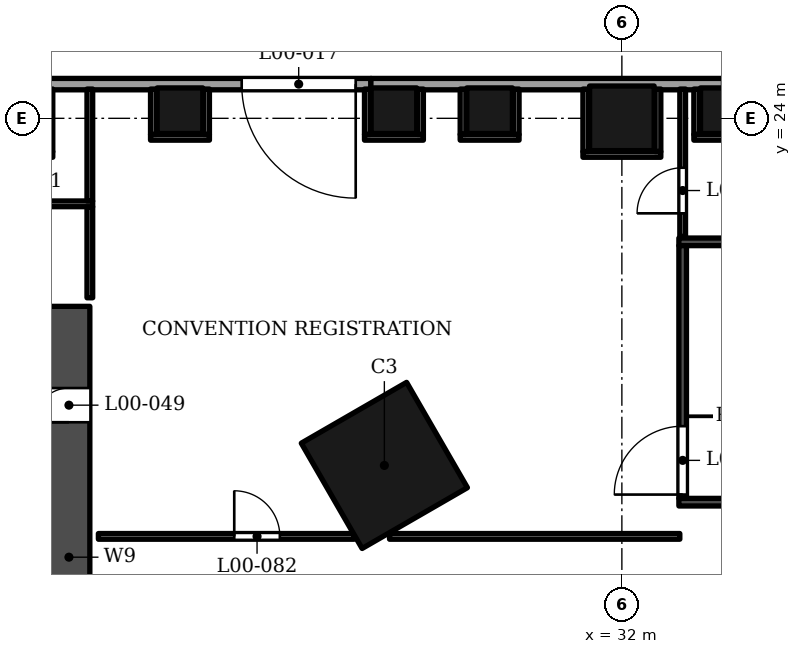
"""IFC4 building model, lengths in metres.
Left out: names, types, materials, properties, quantities, classifications, styles, units other than length and angle.
Written with IfcOpenShell. Run it as: python <this file> out.ifc"""

import sys

from ifc_helpers import new_model, si_unit, direction, frame, frame_2d, origin, origin_2d, place, context, subcontext, project, spatial, rectangle, extrude, element, fill, save


model = new_model("IFC4")
c1 = context("Model", 3, precision=1e-05, world=origin(), true_north=direction((0.0, 1.0)))
c2 = subcontext(c1, "Body", "Model", "MODEL_VIEW")
j1 = project(units=[si_unit("LENGTHUNIT", "METRE"), si_unit("PLANEANGLEUNIT", "RADIAN")], contexts=[c1])
p1 = place(None, origin())
s1 = spatial("IfcSite", under=j1, at=p1, CompositionType="ELEMENT")
p2 = place(p1, origin())
s2 = spatial("IfcBuilding", under=s1, at=p2, CompositionType="ELEMENT")
p3 = place(p2, origin())
s3 = spatial("IfcBuildingStorey", under=s2, at=p3, CompositionType="ELEMENT", Elevation=0.0)
p4 = place(p3, frame((32.0, 24.0, 0.0), z_axis=(0.0, 0.0, 1.0), x_axis=(1.0, 0.0, 0.0)))
e1 = element("IfcColumn", 1, at=p4, inside=s3, PredefinedType="COLUMN", context=c2, shape_type="SweptSolid", body=[
    extrude(rectangle(XDim=1.7, YDim=1.7, at=origin_2d()), origin(), (0.0, 0.0, 1.0), 9.0),
])
for number, where, z_axis, x_axis in (
    (2, (34.669, 24.2, 0.0), (0.0, 0.0, 1.0), (1.0, 0.0, 0.0)),
    (3, (26.002, 24.2, 0.0), (0.0, 0.0, 1.0), (1.0, 0.0, 0.0)),
    (4, (20.372, 24.2, 0.0), (0.0, 0.0, 1.0), (1.0, 0.0, 0.0)),
    (5, (28.52, 24.2, 0.0), (0.0, 0.0, 1.0), (1.0, 0.0, 0.0)),
):
    element("IfcColumn", number, at=place(p3, frame(where, z_axis=z_axis, x_axis=x_axis)), inside=s3, PredefinedType="COLUMN", context=c2, shape_type="SweptSolid", body=[
        extrude(rectangle(XDim=1.2, YDim=1.2, at=origin_2d()), origin(), (0.0, 0.0, 1.0), 9.0),
    ])
p5 = place(p3, frame((25.75, 14.867, 0.0), z_axis=(0.0, 0.0, 1.0), x_axis=(-0.866025386331, -0.50000003023, 0.0)))
e6 = element("IfcColumn", 6, at=p5, inside=s3, PredefinedType="COLUMN", context=c2, shape_type="SweptSolid", body=[
    extrude(rectangle(XDim=3.2, YDim=3.2, at=origin_2d()), origin(), (0.0, 0.0, 1.0), 9.0),
])
p6 = place(p3, frame((17.45, 5.853, 0.0), z_axis=(0.0, 0.0, 1.0), x_axis=(0.0, 1.0, 0.0)))
e7 = element("IfcWall", 7, at=p6, inside=s3, PredefinedType="SHEAR", context=c2, shape_type="SweptSolid", body=[
    extrude(rectangle(XDim=13.2, YDim=1.1, at=frame_2d((6.6, 0.0))), origin(), (0.0, 0.0, 1.0), 9.0),
])
p7 = place(p6, frame((4.1, 0.0, 0.0)))
e8 = element("IfcOpeningElement", 8, at=p7, cuts=e7, PredefinedType="OPENING", context=c2, shape_type="SweptSolid", body=[
    extrude(rectangle(XDim=1.6, YDim=2.1, at=frame_2d((0.8, 1.05))), frame((0.0, 0.56, 0.0), z_axis=(0.0, -1.0, 0.0), x_axis=(1.0, 0.0, 0.0)), (0.0, 0.0, 1.0), 1.12),
])
p8 = place(p6, frame((10.15, 0.0, 0.0)))
e9 = element("IfcOpeningElement", 9, at=p8, cuts=e7, PredefinedType="OPENING", context=c2, shape_type="SweptSolid", body=[
    extrude(rectangle(XDim=0.9, YDim=2.1, at=frame_2d((0.45, 1.05))), frame((0.0, 0.56, 0.0), z_axis=(0.0, -1.0, 0.0), x_axis=(1.0, 0.0, 0.0)), (0.0, 0.0, 1.0), 1.12),
])
p9 = place(p3, frame((25.396, 24.9, 0.0), z_axis=(0.0, 0.0, 1.0), x_axis=(-1.0, 0.0, 0.0)))
e10 = element("IfcWall", 10, at=p9, inside=s3, PredefinedType="ELEMENTEDWALL", context=c2, shape_type="SweptSolid", body=[
    extrude(rectangle(XDim=25.15, YDim=0.3, at=frame_2d((12.575, 0.0))), origin(), (0.0, 0.0, 1.0), 7.6),
])
p10 = place(p9, frame((0.4, 0.0, 0.0)))
e11 = element("IfcOpeningElement", 11, at=p10, cuts=e10, PredefinedType="OPENING", context=c2, shape_type="SweptSolid", body=[
    extrude(rectangle(XDim=3.0, YDim=2.7, at=frame_2d((1.5, 1.35))), frame((0.0, 0.16, 0.0), z_axis=(0.0, -1.0, 0.0), x_axis=(1.0, 0.0, 0.0)), (0.0, 0.0, 1.0), 0.32),
])
p11 = place(p3, frame((34.673, 24.9, 0.0), z_axis=(0.0, 0.0, 1.0), x_axis=(-1.0, 0.0, 0.0)))
e12 = element("IfcWall", 12, at=p11, inside=s3, PredefinedType="SOLIDWALL", context=c2, shape_type="SweptSolid", body=[
    extrude(rectangle(XDim=9.277, YDim=0.3, at=frame_2d((4.639, 0.0))), origin(), (0.0, 0.0, 1.0), 7.6),
])
for number, where, z_axis, x_axis in (
    (13, (33.5, 13.9, 0.0), (0.0, 0.0, 1.0), (1.0, 0.0, 0.0)),
    (14, (33.5, 20.75, 0.0), (0.0, 0.0, 1.0), (1.0, 0.0, 0.0)),
):
    element("IfcWall", number, at=place(p3, frame(where, z_axis=z_axis, x_axis=x_axis)), inside=s3, PredefinedType="SOLIDWALL", context=c2, shape_type="SweptSolid", body=[
        extrude(rectangle(XDim=4.87, YDim=0.2, at=frame_2d((2.435, 0.0))), origin(), (0.0, 0.0, 1.0), 8.5),
    ])
p12 = place(p3, frame((33.6, 14.0, 0.0), z_axis=(0.0, 0.0, 1.0), x_axis=(0.0, 1.0, 0.0)))
e15 = element("IfcWall", 15, at=p12, inside=s3, PredefinedType="SOLIDWALL", context=c2, shape_type="SweptSolid", body=[
    extrude(rectangle(XDim=6.65, YDim=0.2, at=frame_2d((3.325, 0.0))), origin(), (0.0, 0.0, 1.0), 8.5),
])
p13 = place(p12, frame((0.1, 0.0, 0.0)))
e16 = element("IfcOpeningElement", 16, at=p13, cuts=e15, PredefinedType="OPENING", context=c2, shape_type="SweptSolid", body=[
    extrude(rectangle(XDim=1.8, YDim=2.4, at=frame_2d((0.9, 1.2))), frame((0.0, 0.11, 0.0), z_axis=(0.0, -1.0, 0.0), x_axis=(1.0, 0.0, 0.0)), (0.0, 0.0, 1.0), 0.22),
])
p14 = place(p3, frame((18.225, 13.0, 0.0), z_axis=(0.0, 0.0, 1.0), x_axis=(1.0, 0.0, 0.0)))
e17 = element("IfcWall", 17, at=p14, inside=s3, PredefinedType="PARTITIONING", context=c2, shape_type="SweptSolid", body=[
    extrude(rectangle(XDim=6.732, YDim=0.15, at=frame_2d((3.366, 0.0))), origin(), (0.0, 0.0, 1.0), 7.6),
])
p15 = place(p14, frame((3.575, 0.0, 0.0)))
e18 = element("IfcOpeningElement", 18, at=p15, cuts=e17, PredefinedType="OPENING", context=c2, shape_type="SweptSolid", body=[
    extrude(rectangle(XDim=1.2, YDim=2.1, at=frame_2d((0.6, 1.05))), frame((0.0, 0.085, 0.0), z_axis=(0.0, -1.0, 0.0), x_axis=(1.0, 0.0, 0.0)), (0.0, 0.0, 1.0), 0.17),
])
p16 = place(p3, frame((25.886, 13.0, 0.0), z_axis=(0.0, 0.0, 1.0), x_axis=(1.0, 0.0, 0.0)))
e19 = element("IfcWall", 19, at=p16, inside=s3, PredefinedType="PARTITIONING", context=c2, shape_type="SweptSolid", body=[
    extrude(rectangle(XDim=7.639, YDim=0.15, at=frame_2d((3.819, 0.0))), origin(), (0.0, 0.0, 1.0), 7.3),
])
p17 = place(p3, frame((18.0, 19.278, 0.0), z_axis=(0.0, 0.0, 1.0), x_axis=(0.0, 1.0, 0.0)))
e20 = element("IfcWall", 20, at=p17, inside=s3, PredefinedType="PARTITIONING", context=c2, shape_type="SweptSolid", body=[
    extrude(rectangle(XDim=2.397, YDim=0.15, at=frame_2d((1.198, 0.0))), origin(), (0.0, 0.0, 1.0), 8.5),
])
p18 = place(p3, frame((33.6, 20.89, 0.0), z_axis=(0.0, 0.0, 1.0), x_axis=(0.0, 1.0, 0.0)))
e21 = element("IfcWall", 21, at=p18, inside=s3, PredefinedType="PARTITIONING", context=c2, shape_type="SweptSolid", body=[
    extrude(rectangle(XDim=3.88, YDim=0.15, at=frame_2d((1.94, 0.0))), origin(), (0.0, 0.0, 1.0), 7.6),
])
p19 = place(p18, frame((0.61, 0.0, 0.0)))
e22 = element("IfcOpeningElement", 22, at=p19, cuts=e21, PredefinedType="OPENING", context=c2, shape_type="SweptSolid", body=[
    extrude(rectangle(XDim=1.2, YDim=2.1, at=frame_2d((0.6, 1.05))), frame((0.0, 0.085, 0.0), z_axis=(0.0, -1.0, 0.0), x_axis=(1.0, 0.0, 0.0)), (0.0, 0.0, 1.0), 0.17),
])
p20 = place(p3, frame((-18.075, 21.75, 0.0), z_axis=(0.0, 0.0, 1.0), x_axis=(1.0, 0.0, 0.0)))
e23 = element("IfcWall", 23, at=p20, inside=s3, PredefinedType="PARTITIONING", context=c2, shape_type="SweptSolid", body=[
    extrude(rectangle(XDim=36.15, YDim=0.15, at=frame_2d((18.075, 0.0))), origin(), (0.0, 0.0, 1.0), 7.3),
])
p21 = place(p20, frame((2.675, 0.0, 0.0)))
e24 = element("IfcOpeningElement", 24, at=p21, cuts=e23, PredefinedType="OPENING", context=c2, shape_type="SweptSolid", body=[
    extrude(rectangle(XDim=0.9, YDim=2.1, at=frame_2d((0.45, 1.05))), frame((0.0, 0.085, 0.0), z_axis=(0.0, -1.0, 0.0), x_axis=(1.0, 0.0, 0.0)), (0.0, 0.0, 1.0), 0.17),
])
p22 = place(p20, frame((8.675, 0.0, 0.0)))
e25 = element("IfcOpeningElement", 25, at=p22, cuts=e23, PredefinedType="OPENING", context=c2, shape_type="SweptSolid", body=[
    extrude(rectangle(XDim=0.9, YDim=2.1, at=frame_2d((0.45, 1.05))), frame((0.0, 0.085, 0.0), z_axis=(0.0, -1.0, 0.0), x_axis=(1.0, 0.0, 0.0)), (0.0, 0.0, 1.0), 0.17),
])
p23 = place(p20, frame((14.675, 0.0, 0.0)))
e26 = element("IfcOpeningElement", 26, at=p23, cuts=e23, PredefinedType="OPENING", context=c2, shape_type="SweptSolid", body=[
    extrude(rectangle(XDim=0.9, YDim=2.1, at=frame_2d((0.45, 1.05))), frame((0.0, 0.085, 0.0), z_axis=(0.0, -1.0, 0.0), x_axis=(1.0, 0.0, 0.0)), (0.0, 0.0, 1.0), 0.17),
])
p24 = place(p20, frame((20.675, 0.0, 0.0)))
e27 = element("IfcOpeningElement", 27, at=p24, cuts=e23, PredefinedType="OPENING", context=c2, shape_type="SweptSolid", body=[
    extrude(rectangle(XDim=0.9, YDim=2.1, at=frame_2d((0.45, 1.05))), frame((0.0, 0.085, 0.0), z_axis=(0.0, -1.0, 0.0), x_axis=(1.0, 0.0, 0.0)), (0.0, 0.0, 1.0), 0.17),
])
p25 = place(p20, frame((26.675, 0.0, 0.0)))
e28 = element("IfcOpeningElement", 28, at=p25, cuts=e23, PredefinedType="OPENING", context=c2, shape_type="SweptSolid", body=[
    extrude(rectangle(XDim=0.9, YDim=2.1, at=frame_2d((0.45, 1.05))), frame((0.0, 0.085, 0.0), z_axis=(0.0, -1.0, 0.0), x_axis=(1.0, 0.0, 0.0)), (0.0, 0.0, 1.0), 0.17),
])
p26 = place(p20, frame((32.675, 0.0, 0.0)))
e29 = element("IfcOpeningElement", 29, at=p26, cuts=e23, PredefinedType="OPENING", context=c2, shape_type="SweptSolid", body=[
    extrude(rectangle(XDim=0.9, YDim=2.1, at=frame_2d((0.45, 1.05))), frame((0.0, 0.085, 0.0), z_axis=(0.0, -1.0, 0.0), x_axis=(1.0, 0.0, 0.0)), (0.0, 0.0, 1.0), 0.17),
])
p27 = place(p3, frame((18.0, 21.825, 0.0), z_axis=(0.0, 0.0, 1.0), x_axis=(0.0, 1.0, 0.0)))
e30 = element("IfcWall", 30, at=p27, inside=s3, PredefinedType="PARTITIONING", context=c2, shape_type="SweptSolid", body=[
    extrude(rectangle(XDim=2.945, YDim=0.15, at=frame_2d((1.473, 0.0))), origin(), (0.0, 0.0, 1.0), 7.3),
])
for number, where, z_axis, x_axis in (
    (31, (14.975, 23.05, 0.0), (0.0, 0.0, 1.0), (1.0, 0.0, 0.0)),
    (32, (30.975, 23.05, 0.0), (0.0, 0.0, 1.0), (1.0, 0.0, 0.0)),
):
    element("IfcWall", number, at=place(p3, frame(where, z_axis=z_axis, x_axis=x_axis)), inside=s3, PredefinedType="PARTITIONING", context=c2, shape_type="SweptSolid", body=[
        extrude(rectangle(XDim=2.05, YDim=0.15, at=frame_2d((1.025, 0.0))), origin(), (0.0, 0.0, 1.0), 7.3),
    ])
for number, where, z_axis, x_axis in (
    (33, (16.95, 23.125, 0.0), (0.0, 0.0, 1.0), (0.0, 1.0, 0.0)),
    (34, (31.05, 23.125, 0.0), (0.0, 0.0, 1.0), (0.0, 1.0, 0.0)),
):
    element("IfcWall", number, at=place(p3, frame(where, z_axis=z_axis, x_axis=x_axis)), inside=s3, PredefinedType="PARTITIONING", context=c2, shape_type="SweptSolid", body=[
        extrude(rectangle(XDim=1.645, YDim=0.15, at=frame_2d((0.823, 0.0))), origin(), (0.0, 0.0, 1.0), 7.3),
    ])
p28 = place(p3, frame((32.95, 23.125, 0.0), z_axis=(0.0, 0.0, 1.0), x_axis=(0.0, 1.0, 0.0)))
e35 = element("IfcWall", 35, at=p28, inside=s3, PredefinedType="PARTITIONING", context=c2, shape_type="SweptSolid", body=[
    extrude(rectangle(XDim=1.645, YDim=0.15, at=frame_2d((0.823, 0.0))), origin(), (0.0, 0.0, 1.0), 7.6),
])
for number, where, z_axis, x_axis in (
    (36, (19.597, 23.5, 0.0), (0.0, 0.0, 1.0), (1.0, 0.0, 0.0)),
    (37, (25.227, 23.5, 0.0), (0.0, 0.0, 1.0), (1.0, 0.0, 0.0)),
):
    element("IfcWall", number, at=place(p3, frame(where, z_axis=z_axis, x_axis=x_axis)), inside=s3, PredefinedType="PARTITIONING", context=c2, shape_type="SweptSolid", body=[
        extrude(rectangle(XDim=1.55, YDim=0.15, at=frame_2d((0.775, 0.0))), origin(), (0.0, 0.0, 1.0), 8.5),
    ])
p29 = place(p3, frame((27.745, 23.5, 0.0), z_axis=(0.0, 0.0, 1.0), x_axis=(1.0, 0.0, 0.0)))
e38 = element("IfcWall", 38, at=p29, inside=s3, PredefinedType="PARTITIONING", context=c2, shape_type="SweptSolid", body=[
    extrude(rectangle(XDim=1.55, YDim=0.15, at=frame_2d((0.775, 0.0))), origin(), (0.0, 0.0, 1.0), 8.5),
])
p30 = place(p3, frame((33.894, 23.5, 0.0), z_axis=(0.0, 0.0, 1.0), x_axis=(1.0, 0.0, 0.0)))
e39 = element("IfcWall", 39, at=p30, inside=s3, PredefinedType="PARTITIONING", context=c2, shape_type="SweptSolid", body=[
    extrude(rectangle(XDim=1.55, YDim=0.15, at=frame_2d((0.775, 0.0))), origin(), (0.0, 0.0, 1.0), 8.5),
])
for number, where, z_axis, x_axis in (
    (40, (19.672, 23.575, 0.0), (0.0, 0.0, 1.0), (0.0, 1.0, 0.0)),
    (41, (21.072, 23.575, 0.0), (0.0, 0.0, 1.0), (0.0, 1.0, 0.0)),
    (42, (25.302, 23.575, 0.0), (0.0, 0.0, 1.0), (0.0, 1.0, 0.0)),
):
    element("IfcWall", number, at=place(p3, frame(where, z_axis=z_axis, x_axis=x_axis)), inside=s3, PredefinedType="PARTITIONING", context=c2, shape_type="SweptSolid", body=[
        extrude(rectangle(XDim=1.195, YDim=0.15, at=frame_2d((0.598, 0.0))), origin(), (0.0, 0.0, 1.0), 7.3),
    ])
for number, where, z_axis, x_axis in (
    (43, (26.702, 23.575, 0.0), (0.0, 0.0, 1.0), (0.0, 1.0, 0.0)),
    (44, (27.82, 23.575, 0.0), (0.0, 0.0, 1.0), (0.0, 1.0, 0.0)),
):
    element("IfcWall", number, at=place(p3, frame(where, z_axis=z_axis, x_axis=x_axis)), inside=s3, PredefinedType="PARTITIONING", context=c2, shape_type="SweptSolid", body=[
        extrude(rectangle(XDim=1.195, YDim=0.15, at=frame_2d((0.598, 0.0))), origin(), (0.0, 0.0, 1.0), 7.6),
    ])
p31 = place(p3, frame((29.22, 23.575, 0.0), z_axis=(0.0, 0.0, 1.0), x_axis=(0.0, 1.0, 0.0)))
e45 = element("IfcWall", 45, at=p31, inside=s3, PredefinedType="PARTITIONING", context=c2, shape_type="SweptSolid", body=[
    extrude(rectangle(XDim=1.195, YDim=0.15, at=frame_2d((0.598, 0.0))), origin(), (0.0, 0.0, 1.0), 7.3),
])
p32 = place(p3, frame((33.969, 23.575, 0.0), z_axis=(0.0, 0.0, 1.0), x_axis=(0.0, 1.0, 0.0)))
e46 = element("IfcWall", 46, at=p32, inside=s3, PredefinedType="PARTITIONING", context=c2, shape_type="SweptSolid", body=[
    extrude(rectangle(XDim=1.195, YDim=0.15, at=frame_2d((0.598, 0.0))), origin(), (0.0, 0.0, 1.0), 7.6),
])
p33 = place(p10, origin())
e47 = element("IfcDoor", 47, at=p33, inside=s3, OperationType="DOUBLE_DOOR_SINGLE_SWING", PredefinedType="DOOR", context=c2, shape_type="SweptSolid", body=[
    extrude(rectangle(XDim=3.0, YDim=2.7, at=frame_2d((1.5, 1.35))), frame((0.0, 0.025, 0.0), z_axis=(0.0, -1.0, 0.0), x_axis=(1.0, 0.0, 0.0)), (0.0, 0.0, 1.0), 0.05),
])
fill(e11, e47)
p34 = place(p8, origin())
e48 = element("IfcDoor", 48, at=p34, inside=s3, OperationType="SINGLE_SWING_LEFT", PredefinedType="DOOR", context=c2, shape_type="SweptSolid", body=[
    extrude(rectangle(XDim=0.9, YDim=2.1, at=frame_2d((0.45, 1.05))), frame((0.0, 0.275, 0.0), z_axis=(0.0, -1.0, 0.0), x_axis=(1.0, 0.0, 0.0)), (0.0, 0.0, 1.0), 0.05),
])
fill(e9, e48)
p35 = place(p13, origin())
e49 = element("IfcDoor", 49, at=p35, inside=s3, OperationType="DOUBLE_DOOR_SINGLE_SWING", PredefinedType="DOOR", context=c2, shape_type="SweptSolid", body=[
    extrude(rectangle(XDim=1.8, YDim=2.4, at=frame_2d((0.9, 1.2))), frame((0.0, 0.025, 0.0), z_axis=(0.0, -1.0, 0.0), x_axis=(1.0, 0.0, 0.0)), (0.0, 0.0, 1.0), 0.05),
])
fill(e16, e49)
p36 = place(p15, origin())
e50 = element("IfcDoor", 50, at=p36, inside=s3, OperationType="SINGLE_SWING_LEFT", PredefinedType="DOOR", context=c2, shape_type="SweptSolid", body=[
    extrude(rectangle(XDim=1.2, YDim=2.1, at=frame_2d((0.6, 1.05))), frame((0.0, 0.025, 0.0), z_axis=(0.0, -1.0, 0.0), x_axis=(1.0, 0.0, 0.0)), (0.0, 0.0, 1.0), 0.05),
])
fill(e18, e50)
p37 = place(p19, origin())
e51 = element("IfcDoor", 51, at=p37, inside=s3, OperationType="SINGLE_SWING_LEFT", PredefinedType="DOOR", context=c2, shape_type="SweptSolid", body=[
    extrude(rectangle(XDim=1.2, YDim=2.1, at=frame_2d((0.6, 1.05))), frame((0.0, 0.025, 0.0), z_axis=(0.0, -1.0, 0.0), x_axis=(1.0, 0.0, 0.0)), (0.0, 0.0, 1.0), 0.05),
])
fill(e22, e51)
save(model, sys.argv[1])
